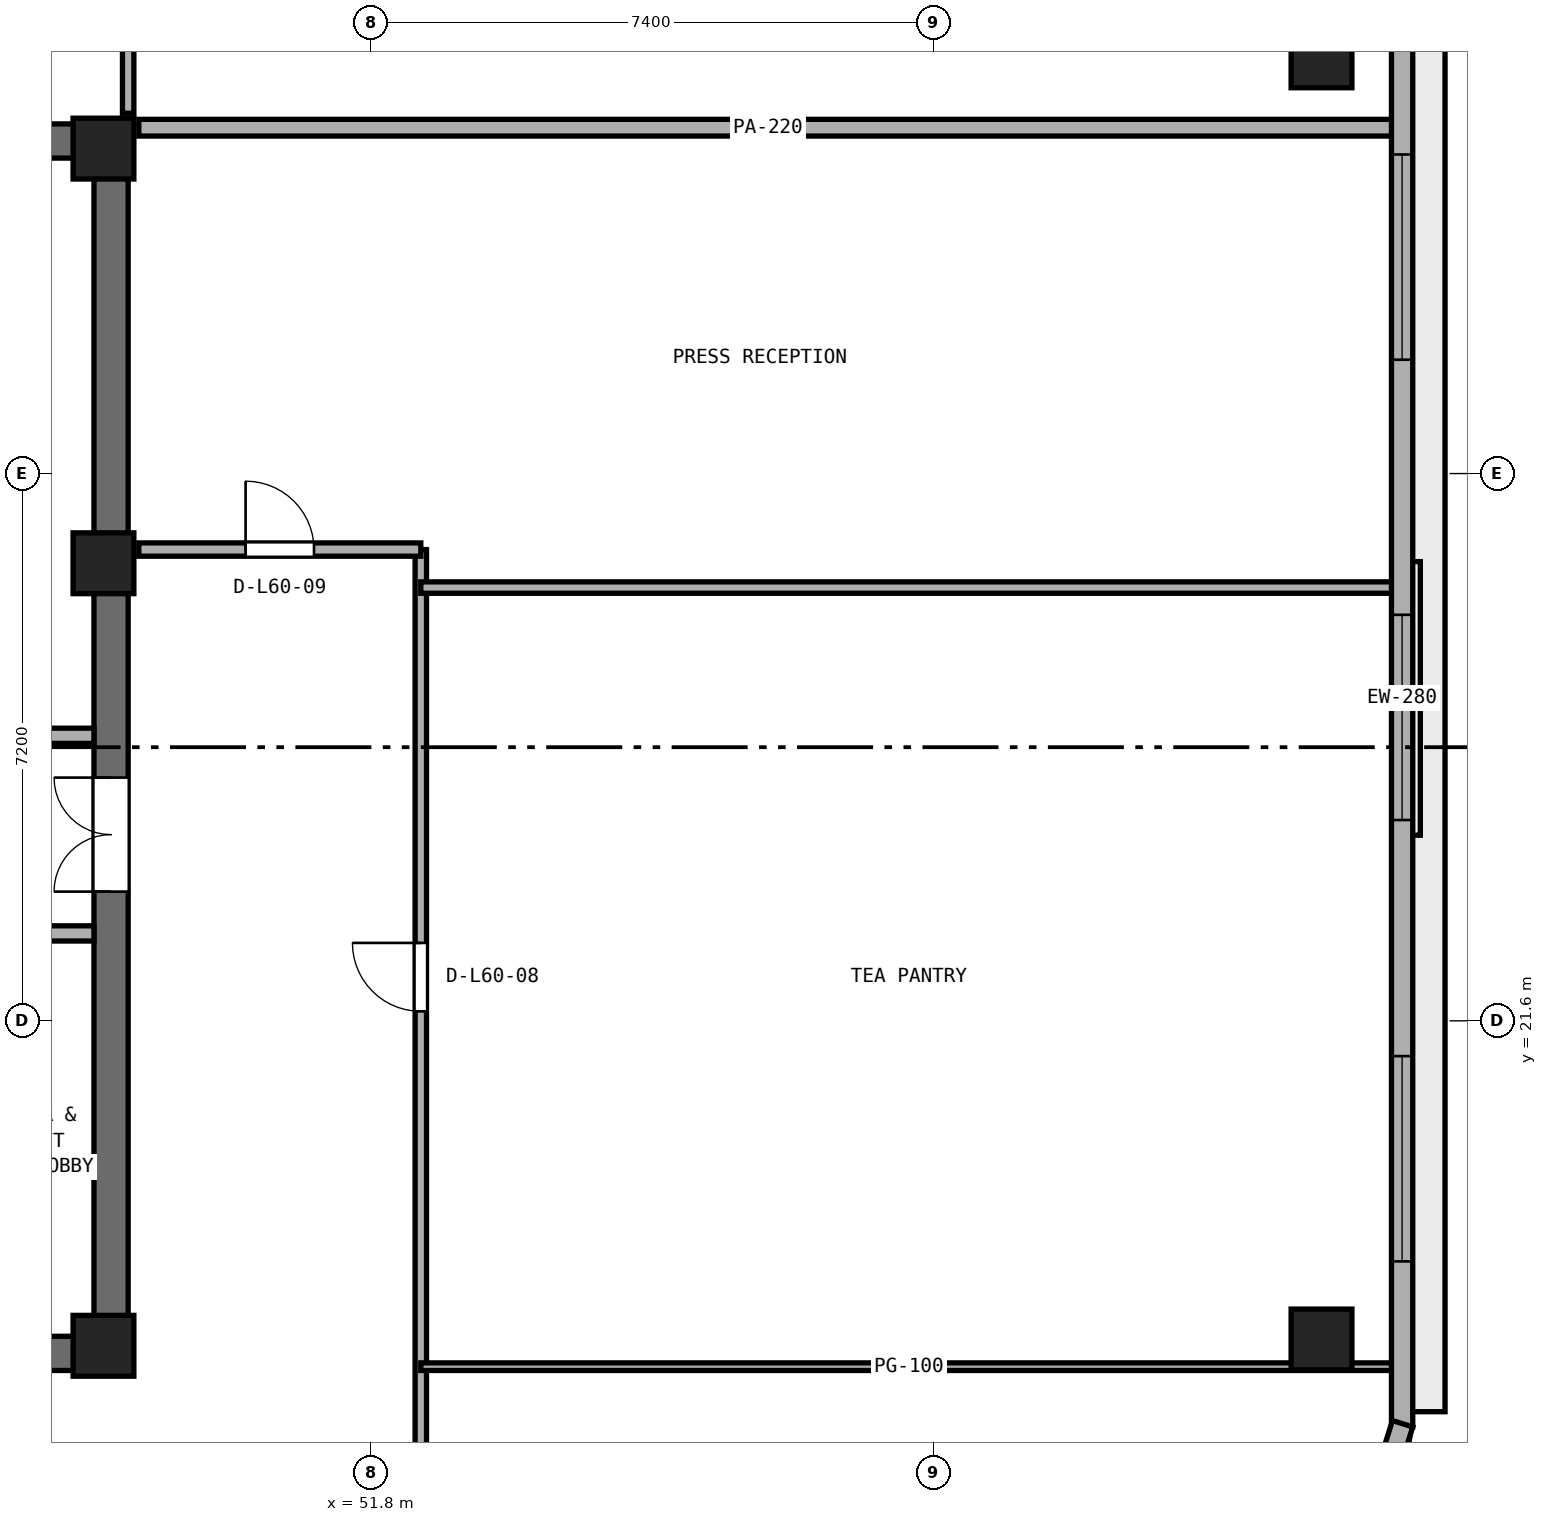
"""IFC4 building model, lengths in metres.
Left out: names, types, materials, properties, quantities, classifications, styles, units other than length and angle.
Written with IfcOpenShell. Run it as: python <this file> out.ifc"""

import sys

from ifc_helpers import new_model, si_unit, direction, frame, frame_2d, origin, origin_2d, place, context, subcontext, project, spatial, rectangle, extrude, element, fill, save


model = new_model("IFC4")
c1 = context("Model", 3, precision=1e-05, world=origin(), true_north=direction((0.0, 1.0)))
c2 = subcontext(c1, "Body", "Model", "MODEL_VIEW")
j1 = project(units=[si_unit("LENGTHUNIT", "METRE"), si_unit("PLANEANGLEUNIT", "RADIAN")], contexts=[c1])
p1 = place(None, origin())
s1 = spatial("IfcSite", under=j1, at=p1, CompositionType="ELEMENT")
p2 = place(p1, origin())
s2 = spatial("IfcBuilding", under=s1, at=p2, CompositionType="ELEMENT")
p3 = place(p2, frame((0.0, 0.0, 236.4)))
s3 = spatial("IfcBuildingStorey", under=s2, at=p3, CompositionType="ELEMENT", Elevation=236.4)
for number, where, z_axis, x_axis in (
    (1, (25.4, 17.225, 0.0), (0.0, 0.0, 1.0), (1.0, 0.0, 0.0)),
    (2, (25.4, 33.175, 0.0), (0.0, 0.0, 1.0), (1.0, 0.0, 0.0)),
):
    element("IfcWall", number, at=place(p3, frame(where, z_axis=z_axis, x_axis=x_axis)), inside=s3, PredefinedType="SHEAR", context=c2, shape_type="SweptSolid", body=[
        extrude(rectangle(XDim=23.2, YDim=0.45, at=frame_2d((11.6, 0.0))), origin(), (0.0, 0.0, 1.0), 3.51),
    ])
p4 = place(p3, frame((48.375, 17.45, 0.0), z_axis=(0.0, 0.0, 1.0), x_axis=(0.0, 1.0, 0.0)))
e3 = element("IfcWall", 3, at=p4, inside=s3, PredefinedType="SHEAR", context=c2, shape_type="SweptSolid", body=[
    extrude(rectangle(XDim=15.5, YDim=0.45, at=frame_2d((7.75, 0.0))), origin(), (0.0, 0.0, 1.0), 3.51),
])
p5 = place(p4, frame((5.85, 0.0, 0.0)))
e4 = element("IfcOpeningElement", 4, at=p5, cuts=e3, PredefinedType="OPENING", context=c2, shape_type="SweptSolid", body=[
    extrude(rectangle(XDim=1.5, YDim=2.15, at=frame_2d((0.75, 1.075))), frame((0.0, 0.235, 0.0), z_axis=(0.0, -1.0, 0.0), x_axis=(1.0, 0.0, 0.0)), (0.0, 0.0, 1.0), 0.47),
])
for number, where, z_axis, x_axis in (
    (5, (48.275, 17.325, 0.0), (0.0, 0.0, 1.0), (1.0, 0.0, 0.0)),
    (6, (48.275, 27.62, 0.0), (0.0, 0.0, 1.0), (1.0, 0.0, 0.0)),
    (7, (48.275, 33.075, 0.0), (0.0, 0.0, 1.0), (1.0, 0.0, 0.0)),
):
    element("IfcColumn", number, at=place(p3, frame(where, z_axis=z_axis, x_axis=x_axis)), inside=s3, PredefinedType="PILASTER", context=c2, shape_type="SweptSolid", body=[
        extrude(rectangle(XDim=0.8, YDim=0.8, at=origin_2d()), origin(), (0.0, 0.0, 1.0), 3.8),
    ])
for number, where, z_axis, x_axis in (
    (8, (64.3, 17.408, 0.0), (0.0, 0.0, 1.0), (1.0, 0.0, 0.0)),
    (9, (64.3, 34.276, 0.0), (0.0, 0.0, 1.0), (1.0, 0.0, 0.0)),
):
    element("IfcColumn", number, at=place(p3, frame(where, z_axis=z_axis, x_axis=x_axis)), inside=s3, PredefinedType="COLUMN", context=c2, shape_type="SweptSolid", body=[
        extrude(rectangle(XDim=0.8, YDim=0.8, at=origin_2d()), origin(), (0.0, 0.0, 1.0), 3.8),
    ])
p6 = place(p3, frame((42.0, 22.75, 0.0), z_axis=(0.0, 0.0, 1.0), x_axis=(1.0, 0.0, 0.0)))
e10 = element("IfcWall", 10, at=p6, inside=s3, PredefinedType="SOLIDWALL", context=c2, shape_type="SweptSolid", body=[
    extrude(rectangle(XDim=6.15, YDim=0.2, at=frame_2d((3.075, 0.0))), origin(), (0.0, 0.0, 1.0), 3.51),
])
p7 = place(p3, frame((46.1, 25.35, 0.0), z_axis=(0.0, 0.0, 1.0), x_axis=(1.0, 0.0, 0.0)))
e11 = element("IfcWall", 11, at=p7, inside=s3, PredefinedType="SOLIDWALL", context=c2, shape_type="SweptSolid", body=[
    extrude(rectangle(XDim=2.05, YDim=0.2, at=frame_2d((1.025, 0.0))), origin(), (0.0, 0.0, 1.0), 3.51),
])
p8 = place(p3, frame((52.45, 13.15, 0.0), z_axis=(0.0, 0.0, 1.0), x_axis=(0.0, 1.0, 0.0)))
e12 = element("IfcWall", 12, at=p8, inside=s3, PredefinedType="PARTITIONING", context=c2, shape_type="SweptSolid", body=[
    extrude(rectangle(XDim=14.65, YDim=0.15, at=frame_2d((7.325, 0.0))), origin(), (0.0, 0.0, 1.0), 3.51),
])
p9 = place(p8, frame((8.575, 0.0, 0.0)))
e13 = element("IfcOpeningElement", 13, at=p9, cuts=e12, PredefinedType="OPENING", context=c2, shape_type="SweptSolid", body=[
    extrude(rectangle(XDim=0.9, YDim=2.1, at=frame_2d((0.45, 1.05))), frame((0.0, 0.085, 0.0), z_axis=(0.0, -1.0, 0.0), x_axis=(1.0, 0.0, 0.0)), (0.0, 0.0, 1.0), 0.17),
])
p10 = place(p3, frame((48.6, 33.54, 0.0), z_axis=(0.0, 0.0, 1.0), x_axis=(0.0, 1.0, 0.0)))
e14 = element("IfcWall", 14, at=p10, inside=s3, PredefinedType="PARTITIONING", context=c2, shape_type="SweptSolid", body=[
    extrude(rectangle(XDim=3.71, YDim=0.15, at=frame_2d((1.855, 0.0))), origin(), (0.0, 0.0, 1.0), 2.893),
])
p11 = place(p3, frame((52.45, 17.05, 0.0), z_axis=(0.0, 0.0, 1.0), x_axis=(1.0, 0.0, 0.0)))
e15 = element("IfcWall", 15, at=p11, inside=s3, PredefinedType="PARTITIONING", context=c2, shape_type="SweptSolid", body=[
    extrude(rectangle(XDim=12.845, YDim=0.1, at=frame_2d((6.422, 0.0))), origin(), (0.0, 0.0, 1.0), 3.51),
])
p12 = place(p3, frame((52.45, 27.3, 0.0), z_axis=(0.0, 0.0, 1.0), x_axis=(1.0, 0.0, 0.0)))
e16 = element("IfcWall", 16, at=p12, inside=s3, PredefinedType="PARTITIONING", context=c2, shape_type="SweptSolid", body=[
    extrude(rectangle(XDim=12.845, YDim=0.15, at=frame_2d((6.422, 0.0))), origin(), (0.0, 0.0, 1.0), 3.51),
])
p13 = place(p3, frame((48.74, 27.8, 0.0), z_axis=(0.0, 0.0, 1.0), x_axis=(1.0, 0.0, 0.0)))
e17 = element("IfcWall", 17, at=p13, inside=s3, PredefinedType="PARTITIONING", context=c2, shape_type="SweptSolid", body=[
    extrude(rectangle(XDim=3.71, YDim=0.175, at=frame_2d((1.855, 0.0))), origin(), (0.0, 0.0, 1.0), 3.51),
])
p14 = place(p13, frame((1.405, 0.0, 0.0)))
e18 = element("IfcOpeningElement", 18, at=p14, cuts=e17, PredefinedType="OPENING", context=c2, shape_type="SweptSolid", body=[
    extrude(rectangle(XDim=0.9, YDim=2.1, at=frame_2d((0.45, 1.05))), frame((0.0, 0.097, 0.0), z_axis=(0.0, -1.0, 0.0), x_axis=(1.0, 0.0, 0.0)), (0.0, 0.0, 1.0), 0.195),
])
p15 = place(p3, frame((48.74, 33.35, 0.0), z_axis=(0.0, 0.0, 1.0), x_axis=(1.0, 0.0, 0.0)))
e19 = element("IfcWall", 19, at=p15, inside=s3, PredefinedType="PARTITIONING", context=c2, shape_type="SweptSolid", body=[
    extrude(rectangle(XDim=16.555, YDim=0.22, at=frame_2d((8.277, 0.0))), origin(), (0.0, 0.0, 1.0), 2.893),
])
p16 = place(p3, frame((65.36, 16.258, 0.0), z_axis=(0.0, 0.0, 1.0), x_axis=(0.0, 1.0, 0.0)))
e20 = element("IfcWall", 20, at=p16, inside=s3, PredefinedType="STANDARD", context=c2, shape_type="SweptSolid", body=[
    extrude(rectangle(XDim=19.168, YDim=0.28, at=frame_2d((9.584, 0.0))), origin(), (0.0, 0.0, 1.0), 3.51),
])
p17 = place(p16, frame((2.178, 0.0, 0.9)))
e21 = element("IfcOpeningElement", 21, at=p17, cuts=e20, PredefinedType="OPENING", context=c2, shape_type="SweptSolid", body=[
    extrude(rectangle(XDim=2.7, YDim=1.75, at=frame_2d((1.35, 0.875))), frame((0.0, 0.15, 0.0), z_axis=(0.0, -1.0, 0.0), x_axis=(1.0, 0.0, 0.0)), (0.0, 0.0, 1.0), 0.3),
])
p18 = place(p16, frame((7.984, 0.0, 0.9)))
e22 = element("IfcOpeningElement", 22, at=p18, cuts=e20, PredefinedType="OPENING", context=c2, shape_type="SweptSolid", body=[
    extrude(rectangle(XDim=2.7, YDim=1.75, at=frame_2d((1.35, 0.875))), frame((0.0, 0.15, 0.0), z_axis=(0.0, -1.0, 0.0), x_axis=(1.0, 0.0, 0.0)), (0.0, 0.0, 1.0), 0.3),
])
p19 = place(p16, frame((14.04, 0.0, 0.9)))
e23 = element("IfcOpeningElement", 23, at=p19, cuts=e20, PredefinedType="OPENING", context=c2, shape_type="SweptSolid", body=[
    extrude(rectangle(XDim=2.7, YDim=1.75, at=frame_2d((1.35, 0.875))), frame((0.0, 0.15, 0.0), z_axis=(0.0, -1.0, 0.0), x_axis=(1.0, 0.0, 0.0)), (0.0, 0.0, 1.0), 0.3),
])
p20 = place(p3, frame((64.635, 13.962, 0.0), z_axis=(0.0, 0.0, 1.0), x_axis=(0.298649578722, 0.954362839348, 0.0)))
e24 = element("IfcWall", 24, at=p20, inside=s3, PredefinedType="STANDARD", context=c2, shape_type="SweptSolid", body=[
    extrude(rectangle(XDim=2.449, YDim=0.28, at=frame_2d((1.225, 0.0))), origin(), (0.0, 0.0, 1.0), 3.51),
])
p21 = place(p5, origin())
e25 = element("IfcDoor", 25, at=p21, inside=s3, OperationType="DOUBLE_DOOR_SINGLE_SWING", PredefinedType="DOOR", context=c2, shape_type="SweptSolid", body=[
    extrude(rectangle(XDim=1.5, YDim=2.15, at=frame_2d((0.75, 1.075))), frame((0.0, 0.025, 0.0), z_axis=(0.0, -1.0, 0.0), x_axis=(1.0, 0.0, 0.0)), (0.0, 0.0, 1.0), 0.05),
])
fill(e4, e25)
p22 = place(p9, origin())
e26 = element("IfcDoor", 26, at=p22, inside=s3, OperationType="SINGLE_SWING_RIGHT", PredefinedType="DOOR", context=c2, shape_type="SweptSolid", body=[
    extrude(rectangle(XDim=0.9, YDim=2.1, at=frame_2d((0.45, 1.05))), frame((0.0, 0.025, 0.0), z_axis=(0.0, -1.0, 0.0), x_axis=(1.0, 0.0, 0.0)), (0.0, 0.0, 1.0), 0.05),
])
fill(e13, e26)
p23 = place(p14, origin())
e27 = element("IfcDoor", 27, at=p23, inside=s3, OperationType="SINGLE_SWING_LEFT", PredefinedType="DOOR", context=c2, shape_type="SweptSolid", body=[
    extrude(rectangle(XDim=0.9, YDim=2.1, at=frame_2d((0.45, 1.05))), frame((0.0, 0.025, 0.0), z_axis=(0.0, -1.0, 0.0), x_axis=(1.0, 0.0, 0.0)), (0.0, 0.0, 1.0), 0.05),
])
fill(e18, e27)
p24 = place(p17, origin())
e28 = element("IfcWindow", 28, at=p24, inside=s3, PartitioningType="SINGLE_PANEL", PredefinedType="WINDOW", context=c2, shape_type="SweptSolid", body=[
    extrude(rectangle(XDim=2.7, YDim=1.75, at=frame_2d((1.35, 0.875))), frame((0.0, 0.03, 0.0), z_axis=(0.0, -1.0, 0.0), x_axis=(1.0, 0.0, 0.0)), (0.0, 0.0, 1.0), 0.06),
])
fill(e21, e28)
p25 = place(p18, origin())
e29 = element("IfcWindow", 29, at=p25, inside=s3, PartitioningType="SINGLE_PANEL", PredefinedType="WINDOW", context=c2, shape_type="SweptSolid", body=[
    extrude(rectangle(XDim=2.7, YDim=1.75, at=frame_2d((1.35, 0.875))), frame((0.0, 0.03, 0.0), z_axis=(0.0, -1.0, 0.0), x_axis=(1.0, 0.0, 0.0)), (0.0, 0.0, 1.0), 0.06),
])
fill(e22, e29)
p26 = place(p19, origin())
e30 = element("IfcWindow", 30, at=p26, inside=s3, PartitioningType="SINGLE_PANEL", PredefinedType="WINDOW", context=c2, shape_type="SweptSolid", body=[
    extrude(rectangle(XDim=2.7, YDim=1.75, at=frame_2d((1.35, 0.875))), frame((0.0, 0.03, 0.0), z_axis=(0.0, -1.0, 0.0), x_axis=(1.0, 0.0, 0.0)), (0.0, 0.0, 1.0), 0.06),
])
fill(e23, e30)
save(model, sys.argv[1])
